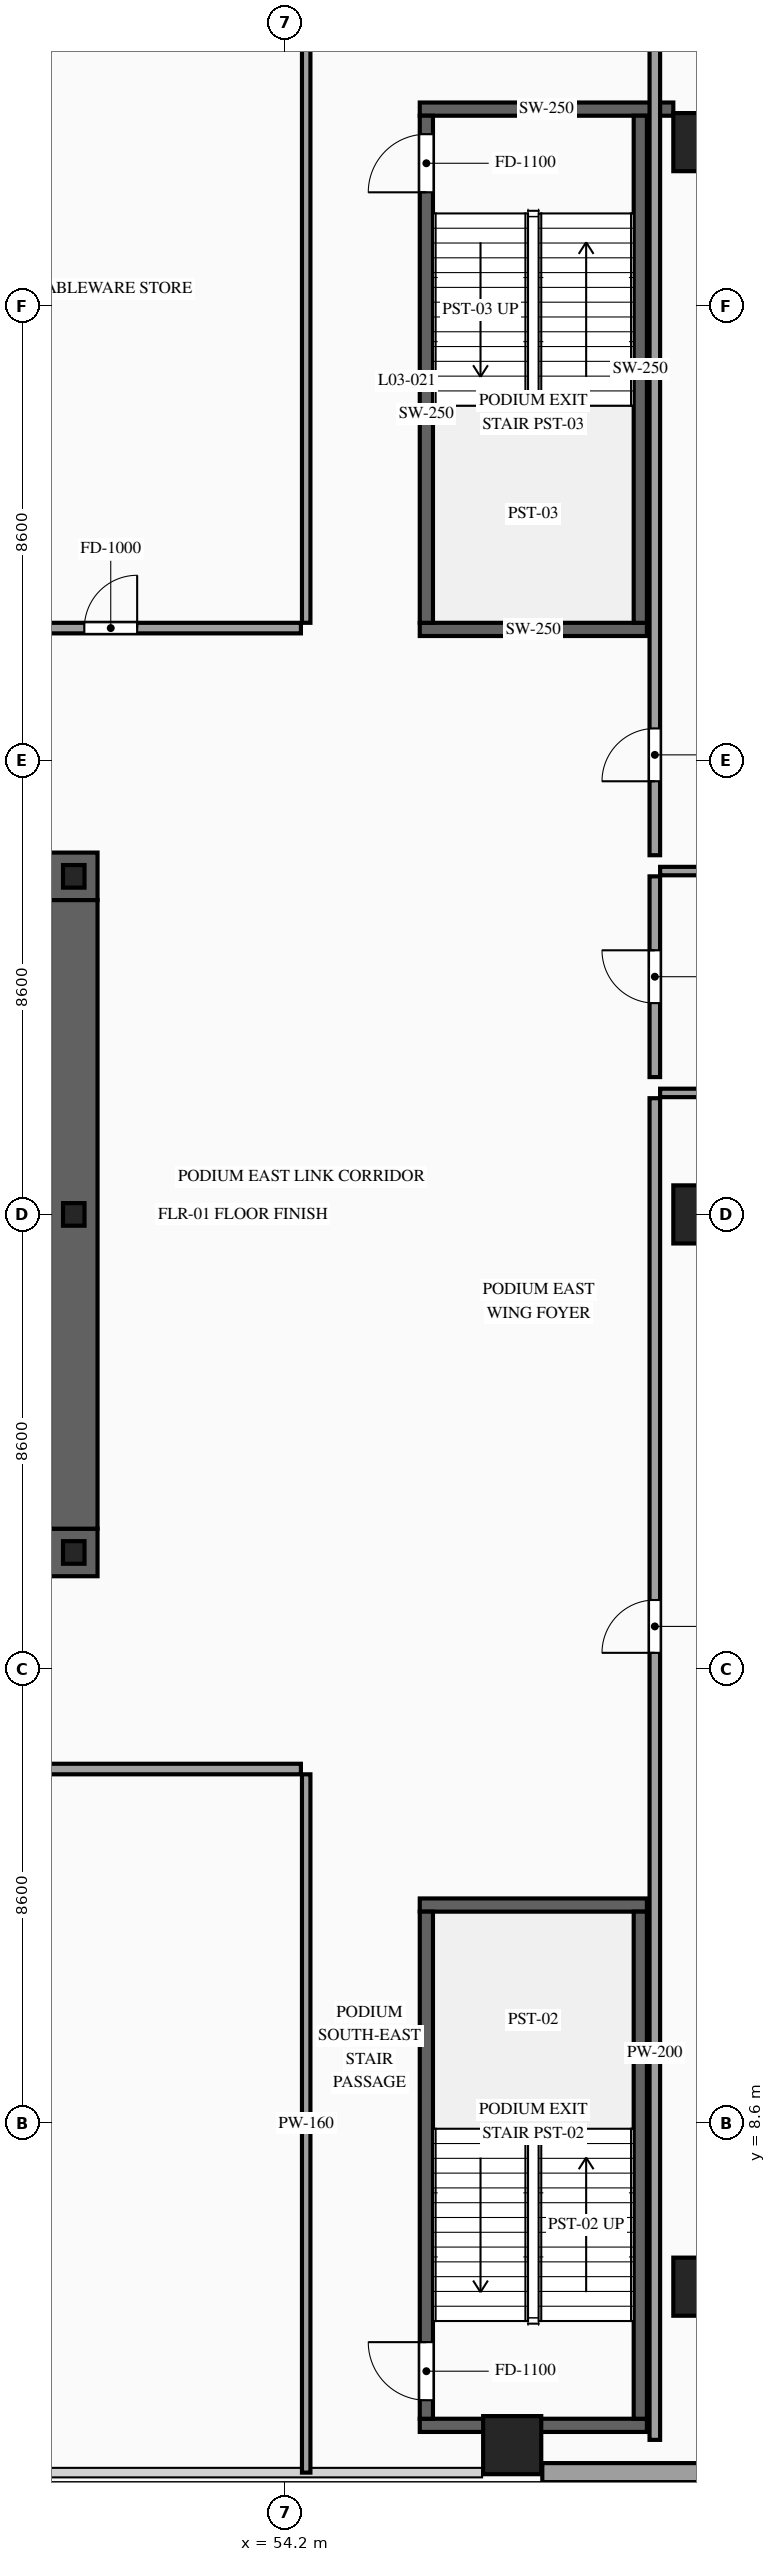
"""IFC4 building model, lengths in metres.
Left out: names, types, materials, properties, quantities, classifications, styles, units other than length and angle.
Written with IfcOpenShell. Run it as: python <this file> out.ifc"""

import sys

from ifc_helpers import new_model, si_unit, direction, frame, frame_2d, origin, origin_2d, place, context, subcontext, project, spatial, rectangle, i_section, extrude, source, transform, mapped, element, fill, save


model = new_model("IFC4")
c1 = context("Model", 3, precision=1e-05, world=origin(), true_north=direction((0.0, 1.0)))
c2 = subcontext(c1, "Body", "Model", "MODEL_VIEW")
j1 = project(units=[si_unit("LENGTHUNIT", "METRE"), si_unit("PLANEANGLEUNIT", "RADIAN")], contexts=[c1])
p1 = place(None, origin())
s1 = spatial("IfcSite", under=j1, at=p1, CompositionType="ELEMENT")
p2 = place(p1, origin())
s2 = spatial("IfcBuilding", under=s1, at=p2, CompositionType="ELEMENT")
p3 = place(p2, frame((0.0, 0.0, 10.2)))
s3 = spatial("IfcBuildingStorey", under=s2, at=p3, CompositionType="ELEMENT", Elevation=10.2)
p4 = place(p3, frame((23.35, 19.4, 0.0), z_axis=(0.0, 0.0, 1.0), x_axis=(1.0, 0.0, 0.0)))
e1 = element("IfcWall", 1, at=p4, inside=s3, PredefinedType="SHEAR", context=c2, shape_type="SweptSolid", body=[
    extrude(rectangle(XDim=27.3, YDim=0.9, at=frame_2d((13.65, 0.0))), origin(), (0.0, 0.0, 1.0), 4.8),
])
p5 = place(p4, frame((2.1, 0.0, 0.0)))
e2 = element("IfcOpeningElement", 2, at=p5, cuts=e1, PredefinedType="OPENING", context=c2, shape_type="SweptSolid", body=[
    extrude(rectangle(XDim=1.1, YDim=2.2, at=frame_2d((0.55, 1.1))), frame((0.0, 0.465, 0.0), z_axis=(0.0, -1.0, 0.0), x_axis=(1.0, 0.0, 0.0)), (0.0, 0.0, 1.0), 0.93),
])
p6 = place(p4, frame((10.0, 0.0, 0.0)))
e3 = element("IfcOpeningElement", 3, at=p6, cuts=e1, PredefinedType="OPENING", context=c2, shape_type="SweptSolid", body=[
    extrude(rectangle(XDim=1.1, YDim=2.2, at=frame_2d((0.55, 1.1))), frame((0.0, 0.465, 0.0), z_axis=(0.0, -1.0, 0.0), x_axis=(1.0, 0.0, 0.0)), (0.0, 0.0, 1.0), 0.93),
])
p7 = place(p4, frame((23.2, 0.0, 0.0)))
e4 = element("IfcOpeningElement", 4, at=p7, cuts=e1, PredefinedType="OPENING", context=c2, shape_type="SweptSolid", body=[
    extrude(rectangle(XDim=1.1, YDim=2.2, at=frame_2d((0.55, 1.1))), frame((0.0, 0.465, 0.0), z_axis=(0.0, -1.0, 0.0), x_axis=(1.0, 0.0, 0.0)), (0.0, 0.0, 1.0), 0.93),
])
p8 = place(p4, frame((19.82, 0.0, 0.0)))
e5 = element("IfcOpeningElement", 5, at=p8, cuts=e1, PredefinedType="OPENING", context=c2, shape_type="SweptSolid", body=[
    extrude(rectangle(XDim=0.9, YDim=2.15, at=frame_2d((0.45, 1.075))), frame((0.0, 0.465, 0.0), z_axis=(0.0, -1.0, 0.0), x_axis=(1.0, 0.0, 0.0)), (0.0, 0.0, 1.0), 0.93),
])
p9 = place(p4, frame((18.38, 0.0, 0.0)))
e6 = element("IfcOpeningElement", 6, at=p9, cuts=e1, PredefinedType="OPENING", context=c2, shape_type="SweptSolid", body=[
    extrude(rectangle(XDim=0.9, YDim=2.15, at=frame_2d((0.45, 1.075))), frame((0.0, 0.465, 0.0), z_axis=(0.0, -1.0, 0.0), x_axis=(1.0, 0.0, 0.0)), (0.0, 0.0, 1.0), 0.93),
])
p10 = place(p3, frame((23.35, 32.2, 0.0), z_axis=(0.0, 0.0, 1.0), x_axis=(1.0, 0.0, 0.0)))
e7 = element("IfcWall", 7, at=p10, inside=s3, PredefinedType="SHEAR", context=c2, shape_type="SweptSolid", body=[
    extrude(rectangle(XDim=27.3, YDim=0.9, at=frame_2d((13.65, 0.0))), origin(), (0.0, 0.0, 1.0), 4.8),
])
p11 = place(p10, frame((4.72, 0.0, 0.0)))
e8 = element("IfcOpeningElement", 8, at=p11, cuts=e7, PredefinedType="OPENING", context=c2, shape_type="SweptSolid", body=[
    extrude(rectangle(XDim=0.9, YDim=2.15, at=frame_2d((0.45, 1.075))), frame((0.0, 0.465, 0.0), z_axis=(0.0, -1.0, 0.0), x_axis=(1.0, 0.0, 0.0)), (0.0, 0.0, 1.0), 0.93),
])
p12 = place(p10, frame((10.0, 0.0, 0.0)))
e9 = element("IfcOpeningElement", 9, at=p12, cuts=e7, PredefinedType="OPENING", context=c2, shape_type="SweptSolid", body=[
    extrude(rectangle(XDim=1.1, YDim=2.2, at=frame_2d((0.55, 1.1))), frame((0.0, 0.465, 0.0), z_axis=(0.0, -1.0, 0.0), x_axis=(1.0, 0.0, 0.0)), (0.0, 0.0, 1.0), 0.93),
])
p13 = place(p10, frame((15.85, 0.0, 0.0)))
e10 = element("IfcOpeningElement", 10, at=p13, cuts=e7, PredefinedType="OPENING", context=c2, shape_type="SweptSolid", body=[
    extrude(rectangle(XDim=1.1, YDim=2.2, at=frame_2d((0.55, 1.1))), frame((0.0, 0.465, 0.0), z_axis=(0.0, -1.0, 0.0), x_axis=(1.0, 0.0, 0.0)), (0.0, 0.0, 1.0), 0.93),
])
m1 = source(origin(), c2, "Body", "SweptSolid", [
    extrude(rectangle(XDim=11.9, YDim=0.9, at=frame_2d((5.95, 0.0))), origin(), (0.0, 0.0, 1.0), 4.8),
])
p14 = place(p3, frame((50.2, 19.85, 0.0), z_axis=(0.0, 0.0, 1.0), x_axis=(0.0, 1.0, 0.0)))
e11 = element("IfcWall", 11, at=p14, inside=s3, PredefinedType="SHEAR", context=c2, shape_type="MappedRepresentation", body=[
    mapped(m1, transform((0.0, 0.0, 0.0), scale=1.0)),
])
m2 = source(origin(), c2, "Body", "SweptSolid", [
    extrude(i_section(OverallWidth=0.407, OverallDepth=0.428, WebThickness=0.02, FlangeThickness=0.035, at=origin_2d()), origin(), (0.0, 0.0, 1.0), 4.8),
])
for number, where, z_axis, x_axis in (
    (12, (50.2, 19.4, 0.0), (0.0, 0.0, 1.0), (1.0, 0.0, 0.0)),
    (13, (50.2, 25.8, 0.0), (0.0, 0.0, 1.0), (1.0, 0.0, 0.0)),
    (14, (50.2, 32.2, 0.0), (0.0, 0.0, 1.0), (1.0, 0.0, 0.0)),
):
    element("IfcColumn", number, at=place(p3, frame(where, z_axis=z_axis, x_axis=x_axis)), inside=s3, PredefinedType="COLUMN", context=c2, shape_type="MappedRepresentation", body=[
        mapped(m2, transform((0.0, 0.0, 0.0), scale=1.0)),
    ])
m3 = source(origin(), c2, "Body", "SweptSolid", [
    extrude(rectangle(XDim=1.1, YDim=1.1, at=origin_2d()), origin(), (0.0, 0.0, 1.0), 4.8),
])
for number, where, z_axis, x_axis in (
    (15, (62.1, 5.5, 0.0), (0.0, 0.0, 1.0), (1.0, 0.0, 0.0)),
    (16, (62.1, 25.8, 0.0), (0.0, 0.0, 1.0), (1.0, 0.0, 0.0)),
    (17, (62.1, 46.1, 0.0), (0.0, 0.0, 1.0), (1.0, 0.0, 0.0)),
    (18, (58.5, 2.5, 0.0), (0.0, 0.0, 1.0), (1.0, 0.0, 0.0)),
):
    element("IfcColumn", number, at=place(p3, frame(where, z_axis=z_axis, x_axis=x_axis)), inside=s3, PredefinedType="COLUMN", context=c2, shape_type="MappedRepresentation", body=[
        mapped(m3, transform((0.0, 0.0, 0.0), scale=1.0)),
    ])
p15 = place(p3, frame((59.07, 1.98, 0.0), z_axis=(0.0, 0.0, 1.0), x_axis=(1.0, 0.0, 0.0)))
e19 = element("IfcWall", 19, at=p15, inside=s3, PredefinedType="SOLIDWALL", context=c2, shape_type="SweptSolid", body=[
    extrude(rectangle(XDim=12.93, YDim=0.36, at=frame_2d((6.465, 0.0))), origin(), (0.0, 0.0, 1.0), 4.52),
])
p16 = place(p15, frame((5.73, 0.0, 0.85)))
e20 = element("IfcOpeningElement", 20, at=p16, cuts=e19, PredefinedType="OPENING", context=c2, shape_type="SweptSolid", body=[
    extrude(rectangle(XDim=2.4, YDim=2.4, at=frame_2d((1.2, 1.2))), frame((0.0, 0.195, 0.0), z_axis=(0.0, -1.0, 0.0), x_axis=(1.0, 0.0, 0.0)), (0.0, 0.0, 1.0), 0.39),
])
m4 = source(origin(), c2, "Body", "SweptSolid", [
    extrude(rectangle(XDim=4.3, YDim=0.25, at=frame_2d((2.15, 0.0))), origin(), (0.0, 0.0, 1.0), 4.52),
])
for number, where, z_axis, x_axis in (
    (21, (56.75, 2.875, 0.0), (0.0, 0.0, 1.0), (1.0, 0.0, 0.0)),
    (22, (56.75, 12.725, 0.0), (0.0, 0.0, 1.0), (1.0, 0.0, 0.0)),
):
    element("IfcWall", number, at=place(p3, frame(where, z_axis=z_axis, x_axis=x_axis)), inside=s3, PredefinedType="SOLIDWALL", context=c2, shape_type="MappedRepresentation", body=[
        mapped(m4, transform((0.0, 0.0, 0.0), scale=1.0)),
    ])
p17 = place(p3, frame((56.875, 3.0, 0.0), z_axis=(0.0, 0.0, 1.0), x_axis=(0.0, 1.0, 0.0)))
e23 = element("IfcWall", 23, at=p17, inside=s3, PredefinedType="SOLIDWALL", context=c2, shape_type="SweptSolid", body=[
    extrude(rectangle(XDim=9.6, YDim=0.25, at=frame_2d((4.8, 0.0))), origin(), (0.0, 0.0, 1.0), 4.52),
])
p18 = place(p17, frame((0.35, 0.0, 0.0)))
e24 = element("IfcOpeningElement", 24, at=p18, cuts=e23, PredefinedType="OPENING", context=c2, shape_type="SweptSolid", body=[
    extrude(rectangle(XDim=1.1, YDim=2.2, at=frame_2d((0.55, 1.1))), frame((0.0, 0.14, 0.0), z_axis=(0.0, -1.0, 0.0), x_axis=(1.0, 0.0, 0.0)), (0.0, 0.0, 1.0), 0.28),
])
m5 = source(origin(), c2, "Body", "SweptSolid", [
    extrude(rectangle(XDim=9.6, YDim=0.25, at=frame_2d((4.8, 0.0))), origin(), (0.0, 0.0, 1.0), 4.52),
])
p19 = place(p3, frame((60.925, 3.0, 0.0), z_axis=(0.0, 0.0, 1.0), x_axis=(0.0, 1.0, 0.0)))
e25 = element("IfcWall", 25, at=p19, inside=s3, PredefinedType="SOLIDWALL", context=c2, shape_type="MappedRepresentation", body=[
    mapped(m5, transform((0.0, 0.0, 0.0), scale=1.0)),
])
p20 = place(p3, frame((56.75, 36.875, 0.0), z_axis=(0.0, 0.0, 1.0), x_axis=(1.0, 0.0, 0.0)))
e26 = element("IfcWall", 26, at=p20, inside=s3, PredefinedType="SOLIDWALL", context=c2, shape_type="MappedRepresentation", body=[
    mapped(m4, transform((0.0, 0.0, 0.0), scale=1.0)),
])
m6 = source(origin(), c2, "Body", "SweptSolid", [
    extrude(rectangle(XDim=4.8, YDim=0.25, at=frame_2d((2.4, 0.0))), origin(), (0.0, 0.0, 1.0), 4.52),
])
p21 = place(p3, frame((56.75, 46.725, 0.0), z_axis=(0.0, 0.0, 1.0), x_axis=(1.0, 0.0, 0.0)))
e27 = element("IfcWall", 27, at=p21, inside=s3, PredefinedType="SOLIDWALL", context=c2, shape_type="MappedRepresentation", body=[
    mapped(m6, transform((0.0, 0.0, 0.0), scale=1.0)),
])
p22 = place(p3, frame((56.875, 37.0, 0.0), z_axis=(0.0, 0.0, 1.0), x_axis=(0.0, 1.0, 0.0)))
e28 = element("IfcWall", 28, at=p22, inside=s3, PredefinedType="SOLIDWALL", context=c2, shape_type="SweptSolid", body=[
    extrude(rectangle(XDim=9.6, YDim=0.25, at=frame_2d((4.8, 0.0))), origin(), (0.0, 0.0, 1.0), 4.52),
])
p23 = place(p22, frame((8.15, 0.0, 0.0)))
e29 = element("IfcOpeningElement", 29, at=p23, cuts=e28, PredefinedType="OPENING", context=c2, shape_type="SweptSolid", body=[
    extrude(rectangle(XDim=1.1, YDim=2.2, at=frame_2d((0.55, 1.1))), frame((0.0, 0.14, 0.0), z_axis=(0.0, -1.0, 0.0), x_axis=(1.0, 0.0, 0.0)), (0.0, 0.0, 1.0), 0.28),
])
p24 = place(p3, frame((60.925, 37.0, 0.0), z_axis=(0.0, 0.0, 1.0), x_axis=(0.0, 1.0, 0.0)))
e30 = element("IfcWall", 30, at=p24, inside=s3, PredefinedType="SOLIDWALL", context=c2, shape_type="MappedRepresentation", body=[
    mapped(m5, transform((0.0, 0.0, 0.0), scale=1.0)),
])
p25 = place(p3, frame((19.5, 15.3, 0.0), z_axis=(0.0, 0.0, 1.0), x_axis=(1.0, 0.0, 0.0)))
e31 = element("IfcWall", 31, at=p25, inside=s3, PredefinedType="PARTITIONING", context=c2, shape_type="SweptSolid", body=[
    extrude(rectangle(XDim=35.0, YDim=0.2, at=frame_2d((17.5, 0.0))), origin(), (0.0, 0.0, 1.0), 4.52),
])
p26 = place(p25, frame((13.5, 0.0, 0.0)))
e32 = element("IfcOpeningElement", 32, at=p26, cuts=e31, PredefinedType="OPENING", context=c2, shape_type="SweptSolid", body=[
    extrude(rectangle(XDim=1.0, YDim=2.2, at=frame_2d((0.5, 1.1))), frame((0.0, 0.115, 0.0), z_axis=(0.0, -1.0, 0.0), x_axis=(1.0, 0.0, 0.0)), (0.0, 0.0, 1.0), 0.23),
])
m7 = source(origin(), c2, "Body", "SweptSolid", [
    extrude(rectangle(XDim=13.22, YDim=0.16, at=frame_2d((6.61, 0.0))), origin(), (0.0, 0.0, 1.0), 4.52),
])
p27 = place(p3, frame((54.6, 1.98, 0.0), z_axis=(0.0, 0.0, 1.0), x_axis=(0.0, 1.0, 0.0)))
e33 = element("IfcWall", 33, at=p27, inside=s3, PredefinedType="PARTITIONING", context=c2, shape_type="MappedRepresentation", body=[
    mapped(m7, transform((0.0, 0.0, 0.0), scale=1.0)),
])
p28 = place(p3, frame((61.2, 2.6, 0.0), z_axis=(0.0, 0.0, 1.0), x_axis=(0.0, 1.0, 0.0)))
e34 = element("IfcWall", 34, at=p28, inside=s3, PredefinedType="PARTITIONING", context=c2, shape_type="SweptSolid", body=[
    extrude(rectangle(XDim=25.4, YDim=0.2, at=frame_2d((12.7, 0.0))), origin(), (0.0, 0.0, 1.0), 4.52),
])
p29 = place(p28, frame((14.9, 0.0, 0.0)))
e35 = element("IfcOpeningElement", 35, at=p29, cuts=e34, PredefinedType="OPENING", context=c2, shape_type="SweptSolid", body=[
    extrude(rectangle(XDim=1.0, YDim=2.2, at=frame_2d((0.5, 1.1))), frame((0.0, 0.115, 0.0), z_axis=(0.0, -1.0, 0.0), x_axis=(1.0, 0.0, 0.0)), (0.0, 0.0, 1.0), 0.23),
])
m8 = source(origin(), c2, "Body", "SweptSolid", [
    extrude(rectangle(XDim=10.52, YDim=0.16, at=frame_2d((5.26, 0.0))), origin(), (0.0, 0.0, 1.0), 4.52),
])
p30 = place(p3, frame((61.3, 28.1, 0.0), z_axis=(0.0, 0.0, 1.0), x_axis=(1.0, 0.0, 0.0)))
e36 = element("IfcWall", 36, at=p30, inside=s3, PredefinedType="PARTITIONING", context=c2, shape_type="MappedRepresentation", body=[
    mapped(m8, transform((0.0, 0.0, 0.0), scale=1.0)),
])
p31 = place(p3, frame((61.2, 28.4, 0.0), z_axis=(0.0, 0.0, 1.0), x_axis=(0.0, 1.0, 0.0)))
e37 = element("IfcWall", 37, at=p31, inside=s3, PredefinedType="PARTITIONING", context=c2, shape_type="SweptSolid", body=[
    extrude(rectangle(XDim=3.8, YDim=0.2, at=frame_2d((1.9, 0.0))), origin(), (0.0, 0.0, 1.0), 4.52),
])
p32 = place(p31, frame((1.4, 0.0, 0.0)))
e38 = element("IfcOpeningElement", 38, at=p32, cuts=e37, PredefinedType="OPENING", context=c2, shape_type="SweptSolid", body=[
    extrude(rectangle(XDim=1.0, YDim=2.2, at=frame_2d((0.5, 1.1))), frame((0.0, 0.115, 0.0), z_axis=(0.0, -1.0, 0.0), x_axis=(1.0, 0.0, 0.0)), (0.0, 0.0, 1.0), 0.23),
])
m9 = source(origin(), c2, "Body", "SweptSolid", [
    extrude(rectangle(XDim=10.52, YDim=0.16, at=frame_2d((5.26, 0.0))), origin(), (0.0, 0.0, 1.0), 4.215),
])
p33 = place(p3, frame((61.3, 32.3, 0.0), z_axis=(0.0, 0.0, 1.0), x_axis=(1.0, 0.0, 0.0)))
e39 = element("IfcWall", 39, at=p33, inside=s3, PredefinedType="PARTITIONING", context=c2, shape_type="MappedRepresentation", body=[
    mapped(m9, transform((0.0, 0.0, 0.0), scale=1.0)),
])
p34 = place(p3, frame((61.2, 32.6, 0.0), z_axis=(0.0, 0.0, 1.0), x_axis=(0.0, 1.0, 0.0)))
e40 = element("IfcWall", 40, at=p34, inside=s3, PredefinedType="PARTITIONING", context=c2, shape_type="SweptSolid", body=[
    extrude(rectangle(XDim=16.4, YDim=0.2, at=frame_2d((8.2, 0.0))), origin(), (0.0, 0.0, 1.0), 4.52),
])
p35 = place(p34, frame((1.4, 0.0, 0.0)))
e41 = element("IfcOpeningElement", 41, at=p35, cuts=e40, PredefinedType="OPENING", context=c2, shape_type="SweptSolid", body=[
    extrude(rectangle(XDim=1.0, YDim=2.2, at=frame_2d((0.5, 1.1))), frame((0.0, 0.115, 0.0), z_axis=(0.0, -1.0, 0.0), x_axis=(1.0, 0.0, 0.0)), (0.0, 0.0, 1.0), 0.23),
])
p36 = place(p3, frame((47.4, 36.9, 0.0), z_axis=(0.0, 0.0, 1.0), x_axis=(1.0, 0.0, 0.0)))
e42 = element("IfcWall", 42, at=p36, inside=s3, PredefinedType="PARTITIONING", context=c2, shape_type="SweptSolid", body=[
    extrude(rectangle(XDim=7.1, YDim=0.2, at=frame_2d((3.55, 0.0))), origin(), (0.0, 0.0, 1.0), 4.52),
])
p37 = place(p36, frame((3.0, 0.0, 0.0)))
e43 = element("IfcOpeningElement", 43, at=p37, cuts=e42, PredefinedType="OPENING", context=c2, shape_type="SweptSolid", body=[
    extrude(rectangle(XDim=1.0, YDim=2.2, at=frame_2d((0.5, 1.1))), frame((0.0, 0.115, 0.0), z_axis=(0.0, -1.0, 0.0), x_axis=(1.0, 0.0, 0.0)), (0.0, 0.0, 1.0), 0.23),
])
m10 = source(origin(), c2, "Body", "SweptSolid", [
    extrude(rectangle(XDim=12.62, YDim=0.16, at=frame_2d((6.31, 0.0))), origin(), (0.0, 0.0, 1.0), 4.52),
])
p38 = place(p3, frame((54.6, 37.0, 0.0), z_axis=(0.0, 0.0, 1.0), x_axis=(0.0, 1.0, 0.0)))
e44 = element("IfcWall", 44, at=p38, inside=s3, PredefinedType="PARTITIONING", context=c2, shape_type="MappedRepresentation", body=[
    mapped(m10, transform((0.0, 0.0, 0.0), scale=1.0)),
])
m11 = source(origin(), c2, "Body", "SweptSolid", [
    extrude(rectangle(XDim=1.1, YDim=2.2, at=frame_2d((0.55, 1.1))), frame((0.0, 0.025, 0.0), z_axis=(0.0, -1.0, 0.0), x_axis=(1.0, 0.0, 0.0)), (0.0, 0.0, 1.0), 0.05),
])
p39 = place(p18, origin())
e45 = element("IfcDoor", 45, at=p39, inside=s3, OperationType="SINGLE_SWING_RIGHT", PredefinedType="DOOR", context=c2, shape_type="MappedRepresentation", body=[
    mapped(m11, transform((0.0, 0.0, 0.0), scale=1.0)),
])
fill(e24, e45)
p40 = place(p23, origin())
e46 = element("IfcDoor", 46, at=p40, inside=s3, OperationType="SINGLE_SWING_LEFT", PredefinedType="DOOR", context=c2, shape_type="MappedRepresentation", body=[
    mapped(m11, transform((0.0, 0.0, 0.0), scale=1.0)),
])
fill(e29, e46)
m12 = source(origin(), c2, "Body", "SweptSolid", [
    extrude(rectangle(XDim=1.0, YDim=2.2, at=frame_2d((0.5, 1.1))), frame((0.0, 0.025, 0.0), z_axis=(0.0, -1.0, 0.0), x_axis=(1.0, 0.0, 0.0)), (0.0, 0.0, 1.0), 0.05),
])
p41 = place(p29, origin())
e47 = element("IfcDoor", 47, at=p41, inside=s3, OperationType="SINGLE_SWING_LEFT", PredefinedType="DOOR", context=c2, shape_type="MappedRepresentation", body=[
    mapped(m12, transform((0.0, 0.0, 0.0), scale=1.0)),
])
fill(e35, e47)
p42 = place(p32, origin())
e48 = element("IfcDoor", 48, at=p42, inside=s3, OperationType="SINGLE_SWING_RIGHT", PredefinedType="DOOR", context=c2, shape_type="MappedRepresentation", body=[
    mapped(m12, transform((0.0, 0.0, 0.0), scale=1.0)),
])
fill(e38, e48)
p43 = place(p35, origin())
e49 = element("IfcDoor", 49, at=p43, inside=s3, OperationType="SINGLE_SWING_LEFT", PredefinedType="DOOR", context=c2, shape_type="MappedRepresentation", body=[
    mapped(m12, transform((0.0, 0.0, 0.0), scale=1.0)),
])
fill(e41, e49)
p44 = place(p37, origin())
e50 = element("IfcDoor", 50, at=p44, inside=s3, OperationType="SINGLE_SWING_RIGHT", PredefinedType="DOOR", context=c2, shape_type="MappedRepresentation", body=[
    mapped(m12, transform((0.0, 0.0, 0.0), scale=1.0)),
])
fill(e43, e50)
save(model, sys.argv[1])
